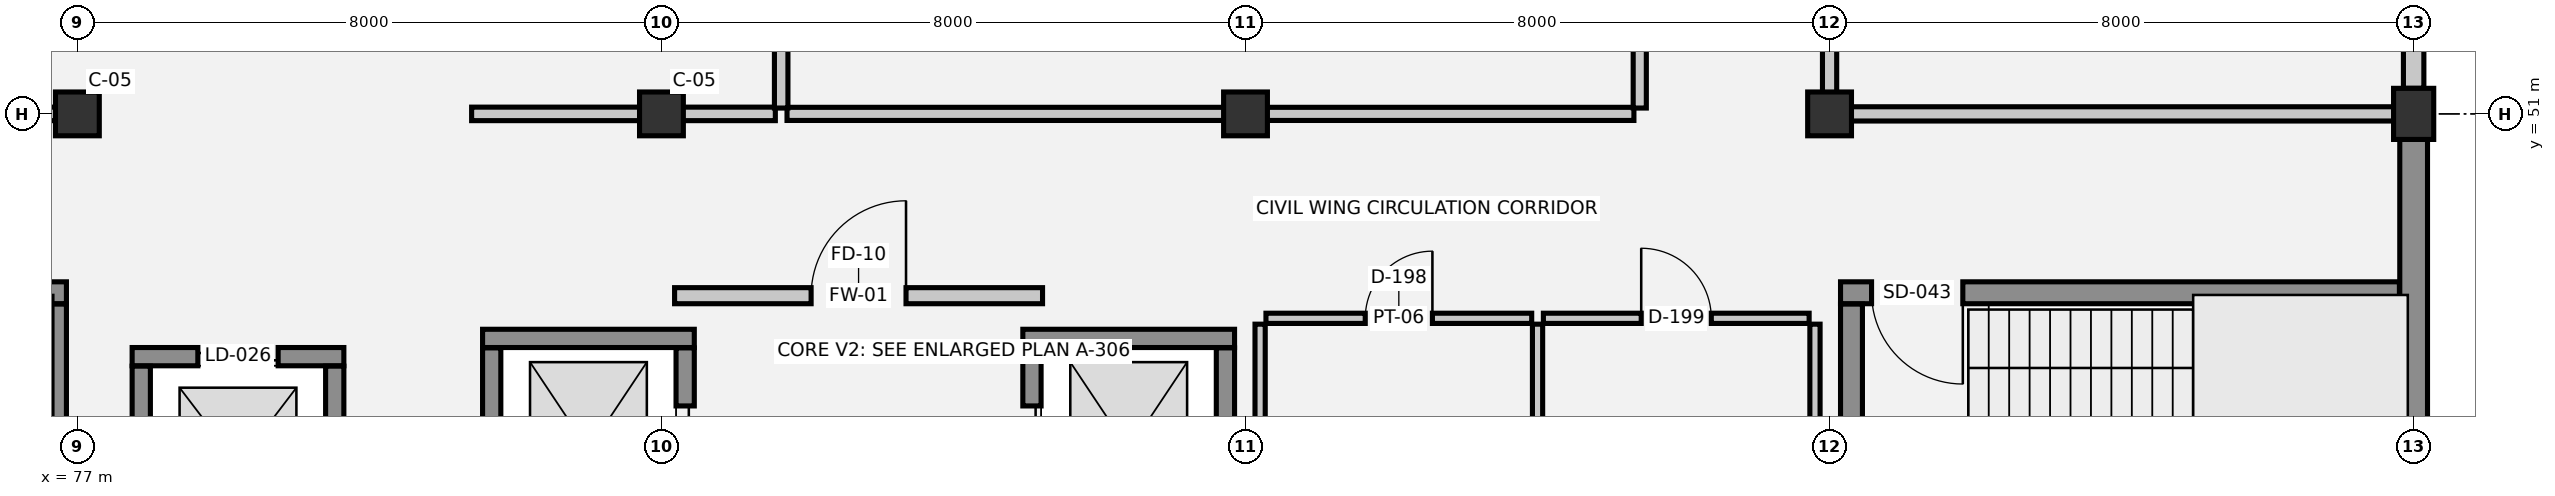
"""IFC4 building model, lengths in metres.
Left out: names, types, materials, properties, quantities, classifications, styles, units other than length and angle.
Written with IfcOpenShell. Run it as: python <this file> out.ifc"""

import sys

from ifc_helpers import new_model, si_unit, direction, frame, frame_2d, origin, origin_2d, place, context, subcontext, project, spatial, rectangle, extrude, element, fill, save


model = new_model("IFC4")
c1 = context("Model", 3, precision=1e-05, world=origin(), true_north=direction((0.0, 1.0)))
c2 = subcontext(c1, "Body", "Model", "MODEL_VIEW")
j1 = project(units=[si_unit("LENGTHUNIT", "METRE"), si_unit("PLANEANGLEUNIT", "RADIAN")], contexts=[c1])
p1 = place(None, origin())
s1 = spatial("IfcSite", under=j1, at=p1, CompositionType="ELEMENT")
p2 = place(p1, origin())
s2 = spatial("IfcBuilding", under=s1, at=p2, CompositionType="ELEMENT")
p3 = place(p2, frame((0.0, 0.0, 33.3)))
s3 = spatial("IfcBuildingStorey", under=s2, at=p3, CompositionType="ELEMENT", Elevation=33.3)
for number, where, z_axis, x_axis in (
    (1, (77.0, 51.0, 0.0), (0.0, 0.0, 1.0), (1.0, 0.0, 0.0)),
    (2, (85.0, 51.0, 0.0), (0.0, 0.0, 1.0), (1.0, 0.0, 0.0)),
    (3, (93.0, 51.0, 0.0), (0.0, 0.0, 1.0), (1.0, 0.0, 0.0)),
    (4, (101.0, 51.0, 0.0), (0.0, 0.0, 1.0), (1.0, 0.0, 0.0)),
):
    element("IfcColumn", number, at=place(p3, frame(where, z_axis=z_axis, x_axis=x_axis)), inside=s3, PredefinedType="COLUMN", context=c2, shape_type="SweptSolid", body=[
        extrude(rectangle(XDim=0.6, YDim=0.6, at=origin_2d()), origin(), (0.0, 0.0, 1.0), 3.75),
    ])
p4 = place(p3, frame((109.0, 51.0, 0.0), z_axis=(0.0, 0.0, 1.0), x_axis=(1.0, 0.0, 0.0)))
e5 = element("IfcColumn", 5, at=p4, inside=s3, PredefinedType="COLUMN", context=c2, shape_type="SweptSolid", body=[
    extrude(rectangle(XDim=0.55, YDim=0.7, at=origin_2d()), origin(), (0.0, 0.0, 1.0), 3.75),
])
p5 = place(p3, frame((109.0, 64.65, 0.0), z_axis=(0.0, 0.0, 1.0), x_axis=(0.0, -1.0, 0.0)))
e6 = element("IfcWall", 6, at=p5, inside=s3, PredefinedType="SOLIDWALL", context=c2, shape_type="SweptSolid", body=[
    extrude(rectangle(XDim=13.3, YDim=0.28, at=frame_2d((6.65, 0.0))), origin(), (0.0, 0.0, 1.0), 2.6),
])
p6 = place(p5, frame((6.1, 0.0, 0.9)))
e7 = element("IfcOpeningElement", 7, at=p6, cuts=e6, PredefinedType="OPENING", context=c2, shape_type="SweptSolid", body=[
    extrude(rectangle(XDim=1.1, YDim=1.2, at=frame_2d((0.55, 0.6))), frame((0.0, 0.15, 0.0), z_axis=(0.0, -1.0, 0.0), x_axis=(1.0, 0.0, 0.0)), (0.0, 0.0, 1.0), 0.3),
])
p7 = place(p3, frame((109.0, 50.65, 0.0), z_axis=(0.0, 0.0, 1.0), x_axis=(0.0, -1.0, 0.0)))
e8 = element("IfcWall", 8, at=p7, inside=s3, PredefinedType="STANDARD", context=c2, shape_type="SweptSolid", body=[
    extrude(rectangle(XDim=6.3, YDim=0.38, at=frame_2d((3.15, 0.0))), origin(), (0.0, 0.0, 1.0), 2.6),
])
p8 = place(p3, frame((80.65, 47.675, 0.0), z_axis=(0.0, 0.0, 1.0), x_axis=(-1.0, 0.0, 0.0)))
e9 = element("IfcWall", 9, at=p8, inside=s3, PredefinedType="SHEAR", context=c2, shape_type="SweptSolid", body=[
    extrude(rectangle(XDim=2.9, YDim=0.25, at=frame_2d((1.45, 0.0))), origin(), (0.0, 0.0, 1.0), 3.75),
])
p9 = place(p8, frame((0.9, 0.0, 0.0)))
e10 = element("IfcOpeningElement", 10, at=p9, cuts=e9, PredefinedType="OPENING", context=c2, shape_type="SweptSolid", body=[
    extrude(rectangle(XDim=1.1, YDim=2.15, at=frame_2d((0.55, 1.075))), frame((0.0, 0.135, 0.0), z_axis=(0.0, -1.0, 0.0), x_axis=(1.0, 0.0, 0.0)), (0.0, 0.0, 1.0), 0.27),
])
for number, where, z_axis, x_axis in (
    (11, (77.875, 47.545, 0.0), (0.0, 0.0, 1.0), (0.0, -1.0, 0.0)),
    (12, (80.525, 44.855, 0.0), (0.0, 0.0, 1.0), (0.0, 1.0, 0.0)),
):
    element("IfcWall", number, at=place(p3, frame(where, z_axis=z_axis, x_axis=x_axis)), inside=s3, PredefinedType="SHEAR", context=c2, shape_type="SweptSolid", body=[
        extrude(rectangle(XDim=2.69, YDim=0.25, at=frame_2d((1.345, 0.0))), origin(), (0.0, 0.0, 1.0), 3.75),
    ])
p10 = place(p3, frame((85.45, 47.925, 0.0), z_axis=(0.0, 0.0, 1.0), x_axis=(-1.0, 0.0, 0.0)))
e13 = element("IfcWall", 13, at=p10, inside=s3, PredefinedType="SHEAR", context=c2, shape_type="SweptSolid", body=[
    extrude(rectangle(XDim=2.9, YDim=0.25, at=frame_2d((1.45, 0.0))), origin(), (0.0, 0.0, 1.0), 3.75),
])
p11 = place(p3, frame((82.675, 47.795, 0.0), z_axis=(0.0, 0.0, 1.0), x_axis=(0.0, -1.0, 0.0)))
e14 = element("IfcWall", 14, at=p11, inside=s3, PredefinedType="SHEAR", context=c2, shape_type="SweptSolid", body=[
    extrude(rectangle(XDim=2.79, YDim=0.25, at=frame_2d((1.395, 0.0))), origin(), (0.0, 0.0, 1.0), 3.75),
])
p12 = place(p3, frame((85.325, 45.005, 0.0), z_axis=(0.0, 0.0, 1.0), x_axis=(0.0, 1.0, 0.0)))
e15 = element("IfcWall", 15, at=p12, inside=s3, PredefinedType="SHEAR", context=c2, shape_type="SweptSolid", body=[
    extrude(rectangle(XDim=2.79, YDim=0.25, at=frame_2d((1.395, 0.0))), origin(), (0.0, 0.0, 1.0), 3.75),
])
p13 = place(p12, frame((0.795, 0.0, 0.0)))
e16 = element("IfcOpeningElement", 16, at=p13, cuts=e15, PredefinedType="OPENING", context=c2, shape_type="SweptSolid", body=[
    extrude(rectangle(XDim=1.2, YDim=2.2, at=frame_2d((0.6, 1.1))), frame((0.0, 0.135, 0.0), z_axis=(0.0, -1.0, 0.0), x_axis=(1.0, 0.0, 0.0)), (0.0, 0.0, 1.0), 0.27),
])
p14 = place(p3, frame((92.85, 47.925, 0.0), z_axis=(0.0, 0.0, 1.0), x_axis=(-1.0, 0.0, 0.0)))
e17 = element("IfcWall", 17, at=p14, inside=s3, PredefinedType="SHEAR", context=c2, shape_type="SweptSolid", body=[
    extrude(rectangle(XDim=2.9, YDim=0.25, at=frame_2d((1.45, 0.0))), origin(), (0.0, 0.0, 1.0), 3.75),
])
p15 = place(p3, frame((90.075, 47.795, 0.0), z_axis=(0.0, 0.0, 1.0), x_axis=(0.0, -1.0, 0.0)))
e18 = element("IfcWall", 18, at=p15, inside=s3, PredefinedType="SHEAR", context=c2, shape_type="SweptSolid", body=[
    extrude(rectangle(XDim=2.79, YDim=0.25, at=frame_2d((1.395, 0.0))), origin(), (0.0, 0.0, 1.0), 3.75),
])
p16 = place(p15, frame((0.795, 0.0, 0.0)))
e19 = element("IfcOpeningElement", 19, at=p16, cuts=e18, PredefinedType="OPENING", context=c2, shape_type="SweptSolid", body=[
    extrude(rectangle(XDim=1.2, YDim=2.2, at=frame_2d((0.6, 1.1))), frame((0.0, 0.135, 0.0), z_axis=(0.0, -1.0, 0.0), x_axis=(1.0, 0.0, 0.0)), (0.0, 0.0, 1.0), 0.27),
])
p17 = place(p3, frame((92.725, 45.005, 0.0), z_axis=(0.0, 0.0, 1.0), x_axis=(0.0, 1.0, 0.0)))
e20 = element("IfcWall", 20, at=p17, inside=s3, PredefinedType="SHEAR", context=c2, shape_type="SweptSolid", body=[
    extrude(rectangle(XDim=2.79, YDim=0.25, at=frame_2d((1.395, 0.0))), origin(), (0.0, 0.0, 1.0), 3.75),
])
p18 = place(p3, frame((76.85, 48.55, 0.0), z_axis=(0.0, 0.0, 1.0), x_axis=(-1.0, 0.0, 0.0)))
e21 = element("IfcWall", 21, at=p18, inside=s3, PredefinedType="SHEAR", context=c2, shape_type="SweptSolid", body=[
    extrude(rectangle(XDim=7.655, YDim=0.3, at=frame_2d((3.828, 0.0))), origin(), (0.0, 0.0, 1.0), 3.47),
])
p19 = place(p18, frame((6.025, 0.0, 0.0)))
e22 = element("IfcOpeningElement", 22, at=p19, cuts=e21, PredefinedType="OPENING", context=c2, shape_type="SweptSolid", body=[
    extrude(rectangle(XDim=1.25, YDim=2.15, at=frame_2d((0.625, 1.075))), frame((0.0, 0.16, 0.0), z_axis=(0.0, -1.0, 0.0), x_axis=(1.0, 0.0, 0.0)), (0.0, 0.0, 1.0), 0.32),
])
p20 = place(p3, frame((76.7, 44.195, 0.0), z_axis=(0.0, 0.0, 1.0), x_axis=(0.0, 1.0, 0.0)))
e23 = element("IfcWall", 23, at=p20, inside=s3, PredefinedType="SHEAR", context=c2, shape_type="SweptSolid", body=[
    extrude(rectangle(XDim=4.2, YDim=0.3, at=frame_2d((2.1, 0.0))), origin(), (0.0, 0.0, 1.0), 3.47),
])
p21 = place(p3, frame((108.805, 48.55, 0.0), z_axis=(0.0, 0.0, 1.0), x_axis=(-1.0, 0.0, 0.0)))
e24 = element("IfcWall", 24, at=p21, inside=s3, PredefinedType="SHEAR", context=c2, shape_type="SweptSolid", body=[
    extrude(rectangle(XDim=7.655, YDim=0.3, at=frame_2d((3.828, 0.0))), origin(), (0.0, 0.0, 1.0), 3.47),
])
p22 = place(p21, frame((5.98, 0.0, 0.0)))
e25 = element("IfcOpeningElement", 25, at=p22, cuts=e24, PredefinedType="OPENING", context=c2, shape_type="SweptSolid", body=[
    extrude(rectangle(XDim=1.25, YDim=2.15, at=frame_2d((0.625, 1.075))), frame((0.0, 0.16, 0.0), z_axis=(0.0, -1.0, 0.0), x_axis=(1.0, 0.0, 0.0)), (0.0, 0.0, 1.0), 0.32),
])
p23 = place(p3, frame((101.3, 48.395, 0.0), z_axis=(0.0, 0.0, 1.0), x_axis=(0.0, -1.0, 0.0)))
e26 = element("IfcWall", 26, at=p23, inside=s3, PredefinedType="SHEAR", context=c2, shape_type="SweptSolid", body=[
    extrude(rectangle(XDim=4.2, YDim=0.3, at=frame_2d((2.1, 0.0))), origin(), (0.0, 0.0, 1.0), 3.47),
])
p24 = place(p3, frame((85.18, 48.51, 0.0), z_axis=(0.0, 0.0, 1.0), x_axis=(1.0, 0.0, 0.0)))
e27 = element("IfcWall", 27, at=p24, inside=s3, PredefinedType="SOLIDWALL", context=c2, shape_type="SweptSolid", body=[
    extrude(rectangle(XDim=5.04, YDim=0.22, at=frame_2d((2.52, 0.0))), origin(), (0.0, 0.0, 1.0), 3.47),
])
p25 = place(p24, frame((1.87, 0.0, 0.0)))
e28 = element("IfcOpeningElement", 28, at=p25, cuts=e27, PredefinedType="OPENING", context=c2, shape_type="SweptSolid", body=[
    extrude(rectangle(XDim=1.3, YDim=2.15, at=frame_2d((0.65, 1.075))), frame((0.0, 0.12, 0.0), z_axis=(0.0, -1.0, 0.0), x_axis=(1.0, 0.0, 0.0)), (0.0, 0.0, 1.0), 0.24),
])
p26 = place(p3, frame((93.28, 48.2, 0.0), z_axis=(0.0, 0.0, 1.0), x_axis=(1.0, 0.0, 0.0)))
e29 = element("IfcWall", 29, at=p26, inside=s3, PredefinedType="PLUMBINGWALL", context=c2, shape_type="SweptSolid", body=[
    extrude(rectangle(XDim=3.64, YDim=0.14, at=frame_2d((1.82, 0.0))), origin(), (0.0, 0.0, 1.0), 3.39),
])
p27 = place(p26, frame((1.36, 0.0, 0.0)))
e30 = element("IfcOpeningElement", 30, at=p27, cuts=e29, PredefinedType="OPENING", context=c2, shape_type="SweptSolid", body=[
    extrude(rectangle(XDim=0.92, YDim=2.1, at=frame_2d((0.46, 1.05))), frame((0.0, 0.08, 0.0), z_axis=(0.0, -1.0, 0.0), x_axis=(1.0, 0.0, 0.0)), (0.0, 0.0, 1.0), 0.16),
])
p28 = place(p3, frame((97.08, 48.2, 0.0), z_axis=(0.0, 0.0, 1.0), x_axis=(1.0, 0.0, 0.0)))
e31 = element("IfcWall", 31, at=p28, inside=s3, PredefinedType="PLUMBINGWALL", context=c2, shape_type="SweptSolid", body=[
    extrude(rectangle(XDim=3.64, YDim=0.14, at=frame_2d((1.82, 0.0))), origin(), (0.0, 0.0, 1.0), 3.39),
])
p29 = place(p28, frame((1.34, 0.0, 0.0)))
e32 = element("IfcOpeningElement", 32, at=p29, cuts=e31, PredefinedType="OPENING", context=c2, shape_type="SweptSolid", body=[
    extrude(rectangle(XDim=0.96, YDim=2.1, at=frame_2d((0.48, 1.05))), frame((0.0, 0.08, 0.0), z_axis=(0.0, -1.0, 0.0), x_axis=(1.0, 0.0, 0.0)), (0.0, 0.0, 1.0), 0.16),
])
p30 = place(p3, frame((69.08, 51.0, 0.0), z_axis=(0.0, 0.0, 1.0), x_axis=(1.0, 0.0, 0.0)))
e33 = element("IfcWall", 33, at=p30, inside=s3, PredefinedType="PARTITIONING", context=c2, shape_type="SweptSolid", body=[
    extrude(rectangle(XDim=8.12, YDim=0.185, at=frame_2d((4.06, 0.0))), origin(), (0.0, 0.0, 1.0), 2.82),
])
p31 = place(p3, frame((82.4, 51.0, 0.0), z_axis=(0.0, 0.0, 1.0), x_axis=(1.0, 0.0, 0.0)))
e34 = element("IfcWall", 34, at=p31, inside=s3, PredefinedType="PARTITIONING", context=c2, shape_type="SweptSolid", body=[
    extrude(rectangle(XDim=4.16, YDim=0.185, at=frame_2d((2.08, 0.0))), origin(), (0.0, 0.0, 1.0), 2.82),
])
p32 = place(p3, frame((86.72, 51.0, 0.0), z_axis=(0.0, 0.0, 1.0), x_axis=(1.0, 0.0, 0.0)))
e35 = element("IfcWall", 35, at=p32, inside=s3, PredefinedType="PARTITIONING", context=c2, shape_type="SweptSolid", body=[
    extrude(rectangle(XDim=11.6, YDim=0.18, at=frame_2d((5.8, 0.0))), origin(), (0.0, 0.0, 1.0), 2.82),
])
p33 = place(p3, frame((101.08, 51.0, 0.0), z_axis=(0.0, 0.0, 1.0), x_axis=(1.0, 0.0, 0.0)))
e36 = element("IfcWall", 36, at=p33, inside=s3, PredefinedType="PARTITIONING", context=c2, shape_type="SweptSolid", body=[
    extrude(rectangle(XDim=7.84, YDim=0.195, at=frame_2d((3.92, 0.0))), origin(), (0.0, 0.0, 1.0), 2.82),
])
p34 = place(p3, frame((86.64, 51.08, 0.0), z_axis=(0.0, 0.0, 1.0), x_axis=(0.0, 1.0, 0.0)))
e37 = element("IfcWall", 37, at=p34, inside=s3, PredefinedType="PARTITIONING", context=c2, shape_type="SweptSolid", body=[
    extrude(rectangle(XDim=13.84, YDim=0.185, at=frame_2d((6.92, 0.0))), origin(), (0.0, 0.0, 1.0), 3.39),
])
for number, where, z_axis, x_axis in (
    (38, (93.2, 44.08, 0.0), (0.0, 0.0, 1.0), (0.0, 1.0, 0.0)),
    (39, (97.0, 44.08, 0.0), (0.0, 0.0, 1.0), (0.0, 1.0, 0.0)),
):
    element("IfcWall", number, at=place(p3, frame(where, z_axis=z_axis, x_axis=x_axis)), inside=s3, PredefinedType="PLUMBINGWALL", context=c2, shape_type="SweptSolid", body=[
        extrude(rectangle(XDim=4.04, YDim=0.14, at=frame_2d((2.02, 0.0))), origin(), (0.0, 0.0, 1.0), 3.39),
    ])
p35 = place(p3, frame((98.4, 51.08, 0.0), z_axis=(0.0, 0.0, 1.0), x_axis=(0.0, 1.0, 0.0)))
e40 = element("IfcWall", 40, at=p35, inside=s3, PredefinedType="PARTITIONING", context=c2, shape_type="SweptSolid", body=[
    extrude(rectangle(XDim=13.84, YDim=0.18, at=frame_2d((6.92, 0.0))), origin(), (0.0, 0.0, 1.0), 3.39),
])
p36 = place(p35, frame((6.345, 0.0, 0.0)))
e41 = element("IfcOpeningElement", 41, at=p36, cuts=e40, PredefinedType="OPENING", context=c2, shape_type="SweptSolid", body=[
    extrude(rectangle(XDim=1.15, YDim=2.2, at=frame_2d((0.575, 1.1))), frame((0.0, 0.1, 0.0), z_axis=(0.0, -1.0, 0.0), x_axis=(1.0, 0.0, 0.0)), (0.0, 0.0, 1.0), 0.2),
])
p37 = place(p3, frame((100.8, 44.08, 0.0), z_axis=(0.0, 0.0, 1.0), x_axis=(0.0, 1.0, 0.0)))
e42 = element("IfcWall", 42, at=p37, inside=s3, PredefinedType="PLUMBINGWALL", context=c2, shape_type="SweptSolid", body=[
    extrude(rectangle(XDim=4.04, YDim=0.14, at=frame_2d((2.02, 0.0))), origin(), (0.0, 0.0, 1.0), 3.39),
])
p38 = place(p3, frame((101.0, 51.08, 0.0), z_axis=(0.0, 0.0, 1.0), x_axis=(0.0, 1.0, 0.0)))
e43 = element("IfcWall", 43, at=p38, inside=s3, PredefinedType="PARTITIONING", context=c2, shape_type="SweptSolid", body=[
    extrude(rectangle(XDim=13.84, YDim=0.195, at=frame_2d((6.92, 0.0))), origin(), (0.0, 0.0, 1.0), 2.62),
])
p39 = place(p38, frame((6.02, 0.0, 0.0)))
e44 = element("IfcOpeningElement", 44, at=p39, cuts=e43, PredefinedType="OPENING", context=c2, shape_type="SweptSolid", body=[
    extrude(rectangle(XDim=1.8, YDim=2.3, at=frame_2d((0.9, 1.15))), frame((0.0, 0.107, 0.0), z_axis=(0.0, -1.0, 0.0), x_axis=(1.0, 0.0, 0.0)), (0.0, 0.0, 1.0), 0.215),
])
p40 = place(p9, origin())
e45 = element("IfcDoor", 45, at=p40, inside=s3, OperationType="DOUBLE_DOOR_SLIDING", PredefinedType="DOOR", context=c2, shape_type="SweptSolid", body=[
    extrude(rectangle(XDim=1.1, YDim=2.15, at=frame_2d((0.55, 1.075))), frame((0.0, 0.025, 0.0), z_axis=(0.0, -1.0, 0.0), x_axis=(1.0, 0.0, 0.0)), (0.0, 0.0, 1.0), 0.05),
])
fill(e10, e45)
p41 = place(p13, origin())
e46 = element("IfcDoor", 46, at=p41, inside=s3, OperationType="DOUBLE_DOOR_SLIDING", PredefinedType="DOOR", context=c2, shape_type="SweptSolid", body=[
    extrude(rectangle(XDim=1.2, YDim=2.2, at=frame_2d((0.6, 1.1))), frame((0.0, 0.025, 0.0), z_axis=(0.0, -1.0, 0.0), x_axis=(1.0, 0.0, 0.0)), (0.0, 0.0, 1.0), 0.05),
])
fill(e16, e46)
p42 = place(p16, origin())
e47 = element("IfcDoor", 47, at=p42, inside=s3, OperationType="DOUBLE_DOOR_SLIDING", PredefinedType="DOOR", context=c2, shape_type="SweptSolid", body=[
    extrude(rectangle(XDim=1.2, YDim=2.2, at=frame_2d((0.6, 1.1))), frame((0.0, 0.025, 0.0), z_axis=(0.0, -1.0, 0.0), x_axis=(1.0, 0.0, 0.0)), (0.0, 0.0, 1.0), 0.05),
])
fill(e19, e47)
p43 = place(p22, origin())
e48 = element("IfcDoor", 48, at=p43, inside=s3, OperationType="SINGLE_SWING_LEFT", PredefinedType="DOOR", context=c2, shape_type="SweptSolid", body=[
    extrude(rectangle(XDim=1.25, YDim=2.15, at=frame_2d((0.625, 1.075))), frame((0.0, 0.025, 0.0), z_axis=(0.0, -1.0, 0.0), x_axis=(1.0, 0.0, 0.0)), (0.0, 0.0, 1.0), 0.05),
])
fill(e25, e48)
p44 = place(p25, origin())
e49 = element("IfcDoor", 49, at=p44, inside=s3, OperationType="SINGLE_SWING_RIGHT", PredefinedType="DOOR", context=c2, shape_type="SweptSolid", body=[
    extrude(rectangle(XDim=1.3, YDim=2.15, at=frame_2d((0.65, 1.075))), frame((0.0, 0.025, 0.0), z_axis=(0.0, -1.0, 0.0), x_axis=(1.0, 0.0, 0.0)), (0.0, 0.0, 1.0), 0.05),
])
fill(e28, e49)
p45 = place(p27, origin())
e50 = element("IfcDoor", 50, at=p45, inside=s3, OperationType="SINGLE_SWING_RIGHT", PredefinedType="DOOR", context=c2, shape_type="SweptSolid", body=[
    extrude(rectangle(XDim=0.92, YDim=2.1, at=frame_2d((0.46, 1.05))), frame((0.0, 0.025, 0.0), z_axis=(0.0, -1.0, 0.0), x_axis=(1.0, 0.0, 0.0)), (0.0, 0.0, 1.0), 0.05),
])
fill(e30, e50)
p46 = place(p29, origin())
e51 = element("IfcDoor", 51, at=p46, inside=s3, OperationType="SINGLE_SWING_LEFT", PredefinedType="DOOR", context=c2, shape_type="SweptSolid", body=[
    extrude(rectangle(XDim=0.96, YDim=2.1, at=frame_2d((0.48, 1.05))), frame((0.0, 0.025, 0.0), z_axis=(0.0, -1.0, 0.0), x_axis=(1.0, 0.0, 0.0)), (0.0, 0.0, 1.0), 0.05),
])
fill(e32, e51)
save(model, sys.argv[1])
